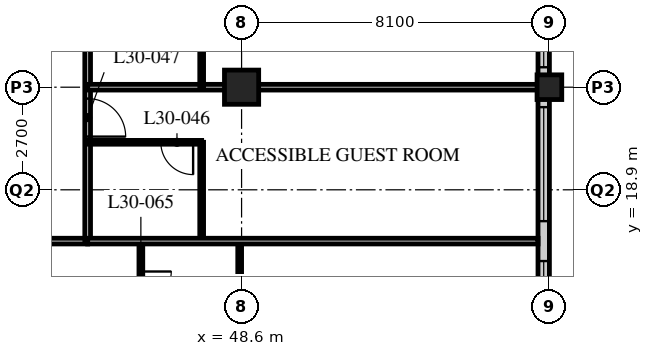
"""IFC4 building model, lengths in metres.
Left out: names, types, materials, properties, quantities, classifications, styles, units other than length and angle.
Written with IfcOpenShell. Run it as: python <this file> out.ifc"""

import sys

from ifc_helpers import new_model, si_unit, direction, frame, frame_2d, origin, origin_2d, place, context, subcontext, project, spatial, rectangle, hollow_rectangle, extrude, element, fill, save


model = new_model("IFC4")
c1 = context("Model", 3, precision=1e-05, world=origin(), true_north=direction((0.0, 1.0)))
c2 = subcontext(c1, "Body", "Model", "MODEL_VIEW")
j1 = project(units=[si_unit("LENGTHUNIT", "METRE"), si_unit("PLANEANGLEUNIT", "RADIAN")], contexts=[c1])
p1 = place(None, origin())
s1 = spatial("IfcSite", under=j1, at=p1, CompositionType="ELEMENT")
p2 = place(p1, origin())
s2 = spatial("IfcBuilding", under=s1, at=p2, CompositionType="ELEMENT")
p3 = place(p2, frame((0.0, 0.0, 120.4)))
s3 = spatial("IfcBuildingStorey", under=s2, at=p3, CompositionType="ELEMENT", Elevation=120.4)
p4 = place(p3, frame((48.6, 21.6, 0.0), z_axis=(0.0, 0.0, 1.0), x_axis=(1.0, 0.0, 0.0)))
e1 = element("IfcColumn", 1, at=p4, inside=s3, PredefinedType="COLUMN", context=c2, shape_type="SweptSolid", body=[
    extrude(hollow_rectangle(XDim=0.9, YDim=0.9, WallThickness=0.09, at=origin_2d()), origin(), (0.0, 0.0, 1.0), 3.4),
])
p5 = place(p3, frame((56.7, 21.6, 0.0), z_axis=(0.0, 0.0, 1.0), x_axis=(1.0, 0.0, 0.0)))
e2 = element("IfcColumn", 2, at=p5, inside=s3, PredefinedType="COLUMN", context=c2, shape_type="SweptSolid", body=[
    extrude(hollow_rectangle(XDim=0.65, YDim=0.65, WallThickness=0.055, at=origin_2d()), origin(), (0.0, 0.0, 1.0), 3.4),
])
p6 = place(p3, frame((56.55, 13.8, 0.0), z_axis=(0.0, 0.0, 1.0), x_axis=(0.0, 1.0, 0.0)))
e3 = element("IfcWall", 3, at=p6, inside=s3, PredefinedType="SOLIDWALL", context=c2, shape_type="SweptSolid", body=[
    extrude(rectangle(XDim=32.1, YDim=0.3, at=frame_2d((16.05, 0.0))), origin(), (0.0, 0.0, 1.0), 3.19),
])
p7 = place(p6, frame((0.225, 0.0, 0.9)))
e4 = element("IfcOpeningElement", 4, at=p7, cuts=e3, PredefinedType="OPENING", context=c2, shape_type="SweptSolid", body=[
    extrude(rectangle(XDim=3.0, YDim=2.0, at=frame_2d((1.5, 1.0))), frame((0.0, 0.16, 0.0), z_axis=(0.0, -1.0, 0.0), x_axis=(1.0, 0.0, 0.0)), (0.0, 0.0, 1.0), 0.32),
])
p8 = place(p6, frame((4.275, 0.0, 0.9)))
e5 = element("IfcOpeningElement", 5, at=p8, cuts=e3, PredefinedType="OPENING", context=c2, shape_type="SweptSolid", body=[
    extrude(rectangle(XDim=3.0, YDim=2.0, at=frame_2d((1.5, 1.0))), frame((0.0, 0.16, 0.0), z_axis=(0.0, -1.0, 0.0), x_axis=(1.0, 0.0, 0.0)), (0.0, 0.0, 1.0), 0.32),
])
p9 = place(p6, frame((8.325, 0.0, 0.9)))
e6 = element("IfcOpeningElement", 6, at=p9, cuts=e3, PredefinedType="OPENING", context=c2, shape_type="SweptSolid", body=[
    extrude(rectangle(XDim=3.0, YDim=2.0, at=frame_2d((1.5, 1.0))), frame((0.0, 0.16, 0.0), z_axis=(0.0, -1.0, 0.0), x_axis=(1.0, 0.0, 0.0)), (0.0, 0.0, 1.0), 0.32),
])
p10 = place(p6, frame((12.375, 0.0, 0.9)))
e7 = element("IfcOpeningElement", 7, at=p10, cuts=e3, PredefinedType="OPENING", context=c2, shape_type="SweptSolid", body=[
    extrude(rectangle(XDim=3.0, YDim=2.0, at=frame_2d((1.5, 1.0))), frame((0.0, 0.16, 0.0), z_axis=(0.0, -1.0, 0.0), x_axis=(1.0, 0.0, 0.0)), (0.0, 0.0, 1.0), 0.32),
])
p11 = place(p6, frame((16.425, 0.0, 0.9)))
e8 = element("IfcOpeningElement", 8, at=p11, cuts=e3, PredefinedType="OPENING", context=c2, shape_type="SweptSolid", body=[
    extrude(rectangle(XDim=3.0, YDim=2.0, at=frame_2d((1.5, 1.0))), frame((0.0, 0.16, 0.0), z_axis=(0.0, -1.0, 0.0), x_axis=(1.0, 0.0, 0.0)), (0.0, 0.0, 1.0), 0.32),
])
p12 = place(p6, frame((20.475, 0.0, 0.9)))
e9 = element("IfcOpeningElement", 9, at=p12, cuts=e3, PredefinedType="OPENING", context=c2, shape_type="SweptSolid", body=[
    extrude(rectangle(XDim=3.0, YDim=2.0, at=frame_2d((1.5, 1.0))), frame((0.0, 0.16, 0.0), z_axis=(0.0, -1.0, 0.0), x_axis=(1.0, 0.0, 0.0)), (0.0, 0.0, 1.0), 0.32),
])
p13 = place(p6, frame((24.525, 0.0, 0.9)))
e10 = element("IfcOpeningElement", 10, at=p13, cuts=e3, PredefinedType="OPENING", context=c2, shape_type="SweptSolid", body=[
    extrude(rectangle(XDim=3.0, YDim=2.0, at=frame_2d((1.5, 1.0))), frame((0.0, 0.16, 0.0), z_axis=(0.0, -1.0, 0.0), x_axis=(1.0, 0.0, 0.0)), (0.0, 0.0, 1.0), 0.32),
])
p14 = place(p6, frame((28.575, 0.0, 0.9)))
e11 = element("IfcOpeningElement", 11, at=p14, cuts=e3, PredefinedType="OPENING", context=c2, shape_type="SweptSolid", body=[
    extrude(rectangle(XDim=3.0, YDim=2.0, at=frame_2d((1.5, 1.0))), frame((0.0, 0.16, 0.0), z_axis=(0.0, -1.0, 0.0), x_axis=(1.0, 0.0, 0.0)), (0.0, 0.0, 1.0), 0.32),
])
p15 = place(p3, frame((12.15, 17.55, 0.0), z_axis=(0.0, 0.0, 1.0), x_axis=(1.0, 0.0, 0.0)))
e12 = element("IfcWall", 12, at=p15, inside=s3, PredefinedType="PARTITIONING", context=c2, shape_type="SweptSolid", body=[
    extrude(rectangle(XDim=32.4, YDim=0.15, at=frame_2d((16.2, 0.0))), origin(), (0.0, 0.0, 1.0), 3.19),
])
p16 = place(p15, frame((5.95, 0.0, 0.0)))
e13 = element("IfcOpeningElement", 13, at=p16, cuts=e12, PredefinedType="OPENING", context=c2, shape_type="SweptSolid", body=[
    extrude(rectangle(XDim=1.0, YDim=2.1, at=frame_2d((0.5, 1.05))), frame((0.0, 0.085, 0.0), z_axis=(0.0, -1.0, 0.0), x_axis=(1.0, 0.0, 0.0)), (0.0, 0.0, 1.0), 0.17),
])
p17 = place(p15, frame((17.725, 0.0, 0.0)))
e14 = element("IfcOpeningElement", 14, at=p17, cuts=e12, PredefinedType="OPENING", context=c2, shape_type="SweptSolid", body=[
    extrude(rectangle(XDim=1.0, YDim=2.1, at=frame_2d((0.5, 1.05))), frame((0.0, 0.085, 0.0), z_axis=(0.0, -1.0, 0.0), x_axis=(1.0, 0.0, 0.0)), (0.0, 0.0, 1.0), 0.17),
])
p18 = place(p15, frame((26.75, 0.0, 0.0)))
e15 = element("IfcOpeningElement", 15, at=p18, cuts=e12, PredefinedType="OPENING", context=c2, shape_type="SweptSolid", body=[
    extrude(rectangle(XDim=1.0, YDim=2.1, at=frame_2d((0.5, 1.05))), frame((0.0, 0.085, 0.0), z_axis=(0.0, -1.0, 0.0), x_axis=(1.0, 0.0, 0.0)), (0.0, 0.0, 1.0), 0.17),
])
p19 = place(p15, frame((1.525, 0.0, 0.0)))
e16 = element("IfcOpeningElement", 16, at=p19, cuts=e12, PredefinedType="OPENING", context=c2, shape_type="SweptSolid", body=[
    extrude(rectangle(XDim=1.0, YDim=2.1, at=frame_2d((0.5, 1.05))), frame((0.0, 0.085, 0.0), z_axis=(0.0, -1.0, 0.0), x_axis=(1.0, 0.0, 0.0)), (0.0, 0.0, 1.0), 0.17),
])
p20 = place(p15, frame((29.875, 0.0, 0.0)))
e17 = element("IfcOpeningElement", 17, at=p20, cuts=e12, PredefinedType="OPENING", context=c2, shape_type="SweptSolid", body=[
    extrude(rectangle(XDim=1.0, YDim=2.1, at=frame_2d((0.5, 1.05))), frame((0.0, 0.085, 0.0), z_axis=(0.0, -1.0, 0.0), x_axis=(1.0, 0.0, 0.0)), (0.0, 0.0, 1.0), 0.17),
])
p21 = place(p3, frame((44.55, 17.55, 0.0), z_axis=(0.0, 0.0, 1.0), x_axis=(0.0, 1.0, 0.0)))
e18 = element("IfcWall", 18, at=p21, inside=s3, PredefinedType="PARTITIONING", context=c2, shape_type="SweptSolid", body=[
    extrude(rectangle(XDim=28.35, YDim=0.15, at=frame_2d((14.175, 0.0))), origin(), (0.0, 0.0, 1.0), 3.19),
])
p22 = place(p21, frame((2.75, 0.0, 0.0)))
e19 = element("IfcOpeningElement", 19, at=p22, cuts=e18, PredefinedType="OPENING", context=c2, shape_type="SweptSolid", body=[
    extrude(rectangle(XDim=1.0, YDim=2.1, at=frame_2d((0.5, 1.05))), frame((0.0, 0.085, 0.0), z_axis=(0.0, -1.0, 0.0), x_axis=(1.0, 0.0, 0.0)), (0.0, 0.0, 1.0), 0.17),
])
p23 = place(p21, frame((6.5, 0.0, 0.0)))
e20 = element("IfcOpeningElement", 20, at=p23, cuts=e18, PredefinedType="OPENING", context=c2, shape_type="SweptSolid", body=[
    extrude(rectangle(XDim=1.0, YDim=2.1, at=frame_2d((0.5, 1.05))), frame((0.0, 0.085, 0.0), z_axis=(0.0, -1.0, 0.0), x_axis=(1.0, 0.0, 0.0)), (0.0, 0.0, 1.0), 0.17),
])
p24 = place(p21, frame((10.0, 0.0, 0.0)))
e21 = element("IfcOpeningElement", 21, at=p24, cuts=e18, PredefinedType="OPENING", context=c2, shape_type="SweptSolid", body=[
    extrude(rectangle(XDim=1.0, YDim=2.1, at=frame_2d((0.5, 1.05))), frame((0.0, 0.085, 0.0), z_axis=(0.0, -1.0, 0.0), x_axis=(1.0, 0.0, 0.0)), (0.0, 0.0, 1.0), 0.17),
])
p25 = place(p21, frame((21.65, 0.0, 0.0)))
e22 = element("IfcOpeningElement", 22, at=p25, cuts=e18, PredefinedType="OPENING", context=c2, shape_type="SweptSolid", body=[
    extrude(rectangle(XDim=1.0, YDim=2.1, at=frame_2d((0.5, 1.05))), frame((0.0, 0.085, 0.0), z_axis=(0.0, -1.0, 0.0), x_axis=(1.0, 0.0, 0.0)), (0.0, 0.0, 1.0), 0.17),
])
p26 = place(p21, frame((26.75, 0.0, 0.0)))
e23 = element("IfcOpeningElement", 23, at=p26, cuts=e18, PredefinedType="OPENING", context=c2, shape_type="SweptSolid", body=[
    extrude(rectangle(XDim=1.0, YDim=2.1, at=frame_2d((0.5, 1.05))), frame((0.0, 0.085, 0.0), z_axis=(0.0, -1.0, 0.0), x_axis=(1.0, 0.0, 0.0)), (0.0, 0.0, 1.0), 0.17),
])
p27 = place(p3, frame((47.55, 17.55, 0.0), z_axis=(0.0, 0.0, 1.0), x_axis=(0.0, 1.0, 0.0)))
e24 = element("IfcWall", 24, at=p27, inside=s3, PredefinedType="PARTITIONING", context=c2, shape_type="SweptSolid", body=[
    extrude(rectangle(XDim=2.6, YDim=0.1, at=frame_2d((1.3, 0.0))), origin(), (0.0, 0.0, 1.0), 3.19),
])
p28 = place(p3, frame((44.55, 20.15, 0.0), z_axis=(0.0, 0.0, 1.0), x_axis=(1.0, 0.0, 0.0)))
e25 = element("IfcWall", 25, at=p28, inside=s3, PredefinedType="PARTITIONING", context=c2, shape_type="SweptSolid", body=[
    extrude(rectangle(XDim=3.0, YDim=0.1, at=frame_2d((1.5, 0.0))), origin(), (0.0, 0.0, 1.0), 3.19),
])
p29 = place(p28, frame((1.925, 0.0, 0.0)))
e26 = element("IfcOpeningElement", 26, at=p29, cuts=e25, PredefinedType="OPENING", context=c2, shape_type="SweptSolid", body=[
    extrude(rectangle(XDim=0.85, YDim=2.1, at=frame_2d((0.425, 1.05))), frame((0.0, 0.06, 0.0), z_axis=(0.0, -1.0, 0.0), x_axis=(1.0, 0.0, 0.0)), (0.0, 0.0, 1.0), 0.12),
])
p30 = place(p3, frame((44.55, 21.6, 0.0), z_axis=(0.0, 0.0, 1.0), x_axis=(1.0, 0.0, 0.0)))
e27 = element("IfcWall", 27, at=p30, inside=s3, PredefinedType="PARTITIONING", context=c2, shape_type="SweptSolid", body=[
    extrude(rectangle(XDim=11.85, YDim=0.15, at=frame_2d((5.925, 0.0))), origin(), (0.0, 0.0, 1.0), 2.578),
])
p31 = place(p3, frame((47.55, 21.6, 0.0), z_axis=(0.0, 0.0, 1.0), x_axis=(0.0, 1.0, 0.0)))
e28 = element("IfcWall", 28, at=p31, inside=s3, PredefinedType="PARTITIONING", context=c2, shape_type="SweptSolid", body=[
    extrude(rectangle(XDim=2.3, YDim=0.1, at=frame_2d((1.15, 0.0))), origin(), (0.0, 0.0, 1.0), 3.19),
])
p32 = place(p3, frame((45.95, 17.55, 0.0), z_axis=(0.0, 0.0, 1.0), x_axis=(0.0, -1.0, 0.0)))
e29 = element("IfcWall", 29, at=p32, inside=s3, PredefinedType="PARTITIONING", context=c2, shape_type="SweptSolid", body=[
    extrude(rectangle(XDim=2.4, YDim=0.1, at=frame_2d((1.2, 0.0))), origin(), (0.0, 0.0, 1.0), 3.19),
])
p33 = place(p32, frame((0.8, 0.0, 0.0)))
e30 = element("IfcOpeningElement", 30, at=p33, cuts=e29, PredefinedType="OPENING", context=c2, shape_type="SweptSolid", body=[
    extrude(rectangle(XDim=0.8, YDim=2.1, at=frame_2d((0.4, 1.05))), frame((0.0, 0.06, 0.0), z_axis=(0.0, -1.0, 0.0), x_axis=(1.0, 0.0, 0.0)), (0.0, 0.0, 1.0), 0.12),
])
p34 = place(p3, frame((48.55, 17.55, 0.0), z_axis=(0.0, 0.0, 1.0), x_axis=(0.0, -1.0, 0.0)))
e31 = element("IfcWall", 31, at=p34, inside=s3, PredefinedType="PARTITIONING", context=c2, shape_type="SweptSolid", body=[
    extrude(rectangle(XDim=2.4, YDim=0.1, at=frame_2d((1.2, 0.0))), origin(), (0.0, 0.0, 1.0), 2.578),
])
p35 = place(p3, frame((44.55, 17.55, 0.0), z_axis=(0.0, 0.0, 1.0), x_axis=(1.0, 0.0, 0.0)))
e32 = element("IfcWall", 32, at=p35, inside=s3, PredefinedType="PARTITIONING", context=c2, shape_type="SweptSolid", body=[
    extrude(rectangle(XDim=11.85, YDim=0.15, at=frame_2d((5.925, 0.0))), origin(), (0.0, 0.0, 1.0), 3.19),
])
p36 = place(p7, origin())
e33 = element("IfcWindow", 33, at=p36, inside=s3, PartitioningType="SINGLE_PANEL", PredefinedType="WINDOW", context=c2, shape_type="SweptSolid", body=[
    extrude(rectangle(XDim=3.0, YDim=2.0, at=frame_2d((1.5, 1.0))), frame((0.0, 0.03, 0.0), z_axis=(0.0, -1.0, 0.0), x_axis=(1.0, 0.0, 0.0)), (0.0, 0.0, 1.0), 0.06),
])
fill(e4, e33)
p37 = place(p8, origin())
e34 = element("IfcWindow", 34, at=p37, inside=s3, PartitioningType="SINGLE_PANEL", PredefinedType="WINDOW", context=c2, shape_type="SweptSolid", body=[
    extrude(rectangle(XDim=3.0, YDim=2.0, at=frame_2d((1.5, 1.0))), frame((0.0, 0.03, 0.0), z_axis=(0.0, -1.0, 0.0), x_axis=(1.0, 0.0, 0.0)), (0.0, 0.0, 1.0), 0.06),
])
fill(e5, e34)
p38 = place(p9, origin())
e35 = element("IfcWindow", 35, at=p38, inside=s3, PartitioningType="SINGLE_PANEL", PredefinedType="WINDOW", context=c2, shape_type="SweptSolid", body=[
    extrude(rectangle(XDim=3.0, YDim=2.0, at=frame_2d((1.5, 1.0))), frame((0.0, 0.03, 0.0), z_axis=(0.0, -1.0, 0.0), x_axis=(1.0, 0.0, 0.0)), (0.0, 0.0, 1.0), 0.06),
])
fill(e6, e35)
p39 = place(p29, origin())
e36 = element("IfcDoor", 36, at=p39, inside=s3, OperationType="SINGLE_SWING_LEFT", PredefinedType="DOOR", context=c2, shape_type="SweptSolid", body=[
    extrude(rectangle(XDim=0.85, YDim=2.1, at=frame_2d((0.425, 1.05))), frame((0.0, 0.025, 0.0), z_axis=(0.0, -1.0, 0.0), x_axis=(1.0, 0.0, 0.0)), (0.0, 0.0, 1.0), 0.05),
])
fill(e26, e36)
p40 = place(p22, origin())
e37 = element("IfcDoor", 37, at=p40, inside=s3, OperationType="SINGLE_SWING_RIGHT", PredefinedType="DOOR", context=c2, shape_type="SweptSolid", body=[
    extrude(rectangle(XDim=1.0, YDim=2.1, at=frame_2d((0.5, 1.05))), frame((0.0, 0.025, 0.0), z_axis=(0.0, -1.0, 0.0), x_axis=(1.0, 0.0, 0.0)), (0.0, 0.0, 1.0), 0.05),
])
fill(e19, e37)
p41 = place(p33, origin())
e38 = element("IfcDoor", 38, at=p41, inside=s3, OperationType="SINGLE_SWING_LEFT", PredefinedType="DOOR", context=c2, shape_type="SweptSolid", body=[
    extrude(rectangle(XDim=0.8, YDim=2.1, at=frame_2d((0.4, 1.05))), frame((0.0, 0.025, 0.0), z_axis=(0.0, -1.0, 0.0), x_axis=(1.0, 0.0, 0.0)), (0.0, 0.0, 1.0), 0.05),
])
fill(e30, e38)
save(model, sys.argv[1])
